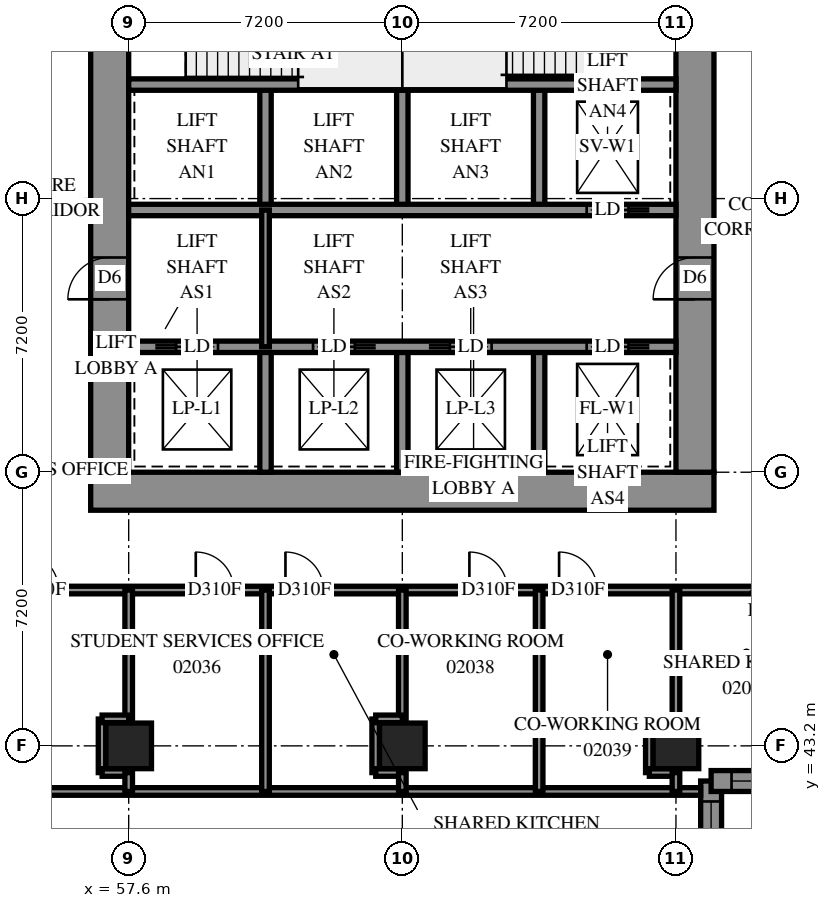
"""IFC4 building model, lengths in metres.
Left out: names, types, materials, properties, quantities, classifications, styles, units other than length and angle.
Written with IfcOpenShell. Run it as: python <this file> out.ifc"""

import sys

from ifc_helpers import new_model, si_unit, direction, frame, frame_2d, origin, origin_2d, place, context, subcontext, project, spatial, polyline, rectangle, outline, extrude, element, fill, save


model = new_model("IFC4")
c1 = context("Model", 3, precision=1e-05, world=origin(), true_north=direction((0.0, 1.0)))
c2 = subcontext(c1, "Body", "Model", "MODEL_VIEW")
j1 = project(units=[si_unit("LENGTHUNIT", "METRE"), si_unit("PLANEANGLEUNIT", "RADIAN")], contexts=[c1])
p1 = place(None, origin())
s1 = spatial("IfcSite", under=j1, at=p1, CompositionType="ELEMENT")
p2 = place(p1, origin())
s2 = spatial("IfcBuilding", under=s1, at=p2, CompositionType="ELEMENT")
p3 = place(p2, frame((0.0, 0.0, 10.2)))
s3 = spatial("IfcBuildingStorey", under=s2, at=p3, CompositionType="ELEMENT", Elevation=10.2)
for number, where, z_axis, x_axis in (
    (1, (57.6, 43.2, 0.0), (0.0, 0.0, 1.0), (1.0, 0.0, 0.0)),
    (2, (64.8, 43.2, 0.0), (0.0, 0.0, 1.0), (1.0, 0.0, 0.0)),
    (3, (72.0, 43.2, 0.0), (0.0, 0.0, 1.0), (1.0, 0.0, 0.0)),
):
    element("IfcColumn", number, at=place(p3, frame(where, z_axis=z_axis, x_axis=x_axis)), inside=s3, PredefinedType="COLUMN", context=c2, shape_type="SweptSolid", body=[
        extrude(rectangle(XDim=1.2, YDim=1.2, at=origin_2d()), origin(), (0.0, 0.0, 1.0), 3.8),
    ])
p4 = place(p3, frame((56.6, 49.9, -0.4), z_axis=(0.0, 0.0, 1.0), x_axis=(1.0, 0.0, 0.0)))
e4 = element("IfcWall", 4, at=p4, inside=s3, PredefinedType="SHEAR", context=c2, shape_type="SweptSolid", body=[
    extrude(rectangle(XDim=16.4, YDim=1.0, at=frame_2d((8.2, 0.0))), origin(), (0.0, 0.0, 1.0), 3.5),
])
p5 = place(p3, frame((57.1, 50.4, -0.4), z_axis=(0.0, 0.0, 1.0), x_axis=(0.0, 1.0, 0.0)))
e5 = element("IfcWall", 5, at=p5, inside=s3, PredefinedType="SHEAR", context=c2, shape_type="SweptSolid", body=[
    extrude(rectangle(XDim=14.4, YDim=1.0, at=frame_2d((7.2, 0.0))), origin(), (0.0, 0.0, 1.0), 3.5),
])
p6 = place(p5, frame((4.55, 0.0, 0.4)))
e6 = element("IfcOpeningElement", 6, at=p6, cuts=e5, PredefinedType="OPENING", context=c2, shape_type="SweptSolid", body=[
    extrude(rectangle(XDim=1.1, YDim=2.1, at=frame_2d((0.55, 1.05))), frame((0.0, 0.51, 0.0), z_axis=(0.0, -1.0, 0.0), x_axis=(1.0, 0.0, 0.0)), (0.0, 0.0, 1.0), 1.02),
])
p7 = place(p5, frame((11.35, 0.0, 0.4)))
e7 = element("IfcOpeningElement", 7, at=p7, cuts=e5, PredefinedType="OPENING", context=c2, shape_type="SweptSolid", body=[
    extrude(rectangle(XDim=1.1, YDim=2.1, at=frame_2d((0.55, 1.05))), frame((0.0, 0.51, 0.0), z_axis=(0.0, -1.0, 0.0), x_axis=(1.0, 0.0, 0.0)), (0.0, 0.0, 1.0), 1.02),
])
p8 = place(p3, frame((72.5, 50.4, -0.4), z_axis=(0.0, 0.0, 1.0), x_axis=(0.0, 1.0, 0.0)))
e8 = element("IfcWall", 8, at=p8, inside=s3, PredefinedType="SHEAR", context=c2, shape_type="SweptSolid", body=[
    extrude(rectangle(XDim=14.4, YDim=1.0, at=frame_2d((7.2, 0.0))), origin(), (0.0, 0.0, 1.0), 3.5),
])
p9 = place(p8, frame((4.55, 0.0, 0.4)))
e9 = element("IfcOpeningElement", 9, at=p9, cuts=e8, PredefinedType="OPENING", context=c2, shape_type="SweptSolid", body=[
    extrude(rectangle(XDim=1.1, YDim=2.1, at=frame_2d((0.55, 1.05))), frame((0.0, 0.51, 0.0), z_axis=(0.0, -1.0, 0.0), x_axis=(1.0, 0.0, 0.0)), (0.0, 0.0, 1.0), 1.02),
])
p10 = place(p8, frame((11.35, 0.0, 0.4)))
e10 = element("IfcOpeningElement", 10, at=p10, cuts=e8, PredefinedType="OPENING", context=c2, shape_type="SweptSolid", body=[
    extrude(rectangle(XDim=1.1, YDim=2.1, at=frame_2d((0.55, 1.05))), frame((0.0, 0.51, 0.0), z_axis=(0.0, -1.0, 0.0), x_axis=(1.0, 0.0, 0.0)), (0.0, 0.0, 1.0), 1.02),
])
for number, where, z_axis, x_axis in (
    (11, (61.2, 50.4, 0.0), (0.0, 0.0, 1.0), (0.0, 1.0, 0.0)),
    (12, (61.2, 57.3, 0.0), (0.0, 0.0, 1.0), (0.0, 1.0, 0.0)),
    (13, (64.8, 50.4, 0.0), (0.0, 0.0, 1.0), (0.0, 1.0, 0.0)),
    (14, (64.8, 57.3, 0.0), (0.0, 0.0, 1.0), (0.0, 1.0, 0.0)),
    (15, (68.4, 50.4, 0.0), (0.0, 0.0, 1.0), (0.0, 1.0, 0.0)),
    (16, (68.4, 57.3, 0.0), (0.0, 0.0, 1.0), (0.0, 1.0, 0.0)),
):
    element("IfcWall", number, at=place(p3, frame(where, z_axis=z_axis, x_axis=x_axis)), inside=s3, PredefinedType="SOLIDWALL", context=c2, shape_type="SweptSolid", body=[
        extrude(rectangle(XDim=3.3, YDim=0.3, at=frame_2d((1.65, 0.0))), origin(), (0.0, 0.0, 1.0), 3.8),
    ])
p11 = place(p3, frame((57.6, 53.7, 0.0), z_axis=(0.0, 0.0, 1.0), x_axis=(1.0, 0.0, 0.0)))
e17 = element("IfcWall", 17, at=p11, inside=s3, PredefinedType="SOLIDWALL", context=c2, shape_type="SweptSolid", body=[
    extrude(rectangle(XDim=14.4, YDim=0.3, at=frame_2d((7.2, 0.0))), origin(), (0.0, 0.0, 1.0), 3.8),
])
p12 = place(p11, frame((1.25, 0.0, 0.0)))
e18 = element("IfcOpeningElement", 18, at=p12, cuts=e17, PredefinedType="OPENING", context=c2, shape_type="SweptSolid", body=[
    extrude(rectangle(XDim=1.1, YDim=2.1, at=frame_2d((0.55, 1.05))), frame((0.0, 0.16, 0.0), z_axis=(0.0, -1.0, 0.0), x_axis=(1.0, 0.0, 0.0)), (0.0, 0.0, 1.0), 0.32),
])
p13 = place(p11, frame((4.85, 0.0, 0.0)))
e19 = element("IfcOpeningElement", 19, at=p13, cuts=e17, PredefinedType="OPENING", context=c2, shape_type="SweptSolid", body=[
    extrude(rectangle(XDim=1.1, YDim=2.1, at=frame_2d((0.55, 1.05))), frame((0.0, 0.16, 0.0), z_axis=(0.0, -1.0, 0.0), x_axis=(1.0, 0.0, 0.0)), (0.0, 0.0, 1.0), 0.32),
])
p14 = place(p11, frame((8.45, 0.0, 0.0)))
e20 = element("IfcOpeningElement", 20, at=p14, cuts=e17, PredefinedType="OPENING", context=c2, shape_type="SweptSolid", body=[
    extrude(rectangle(XDim=1.1, YDim=2.1, at=frame_2d((0.55, 1.05))), frame((0.0, 0.16, 0.0), z_axis=(0.0, -1.0, 0.0), x_axis=(1.0, 0.0, 0.0)), (0.0, 0.0, 1.0), 0.32),
])
p15 = place(p11, frame((12.05, 0.0, 0.0)))
e21 = element("IfcOpeningElement", 21, at=p15, cuts=e17, PredefinedType="OPENING", context=c2, shape_type="SweptSolid", body=[
    extrude(rectangle(XDim=1.1, YDim=2.1, at=frame_2d((0.55, 1.05))), frame((0.0, 0.16, 0.0), z_axis=(0.0, -1.0, 0.0), x_axis=(1.0, 0.0, 0.0)), (0.0, 0.0, 1.0), 0.32),
])
p16 = place(p3, frame((57.6, 57.3, 0.0), z_axis=(0.0, 0.0, 1.0), x_axis=(1.0, 0.0, 0.0)))
e22 = element("IfcWall", 22, at=p16, inside=s3, PredefinedType="SOLIDWALL", context=c2, shape_type="SweptSolid", body=[
    extrude(rectangle(XDim=14.4, YDim=0.3, at=frame_2d((7.2, 0.0))), origin(), (0.0, 0.0, 1.0), 3.8),
])
p17 = place(p16, frame((12.05, 0.0, 0.0)))
e23 = element("IfcOpeningElement", 23, at=p17, cuts=e22, PredefinedType="OPENING", context=c2, shape_type="SweptSolid", body=[
    extrude(rectangle(XDim=1.1, YDim=2.1, at=frame_2d((0.55, 1.05))), frame((0.0, 0.16, 0.0), z_axis=(0.0, -1.0, 0.0), x_axis=(1.0, 0.0, 0.0)), (0.0, 0.0, 1.0), 0.32),
])
for number, where, z_axis, x_axis in (
    (24, (57.6, 60.6, 0.0), (0.0, 0.0, 1.0), (1.0, 0.0, 0.0)),
    (25, (64.8, 60.6, 0.0), (0.0, 0.0, 1.0), (1.0, 0.0, 0.0)),
):
    element("IfcWall", number, at=place(p3, frame(where, z_axis=z_axis, x_axis=x_axis)), inside=s3, PredefinedType="SOLIDWALL", context=c2, shape_type="SweptSolid", body=[
        extrude(rectangle(XDim=7.2, YDim=0.3, at=frame_2d((3.6, 0.0))), origin(), (0.0, 0.0, 1.0), 3.8),
    ])
p18 = place(p3, frame((64.8, 60.6, 0.0), z_axis=(0.0, 0.0, 1.0), x_axis=(0.0, 1.0, 0.0)))
e26 = element("IfcWall", 26, at=p18, inside=s3, PredefinedType="SOLIDWALL", context=c2, shape_type="SweptSolid", body=[
    extrude(rectangle(XDim=4.2, YDim=0.3, at=frame_2d((2.1, 0.0))), origin(), (0.0, 0.0, 1.0), 3.8),
])
p19 = place(p3, frame((72.925, 20.675, 0.0), z_axis=(0.0, 0.0, 1.0), x_axis=(0.0, 1.0, 0.0)))
e27 = element("IfcWall", 27, at=p19, inside=s3, PredefinedType="SOLIDWALL", context=c2, shape_type="SweptSolid", body=[
    extrude(outline(polyline([(-0.275, -0.275), (21.325, -0.275), (21.875, 0.275), (0.275, 0.275), (-0.275, -0.275)])), origin(), (0.0, 0.0, 1.0), 3.8),
])
p20 = place(p19, frame((1.825, 0.0, 0.7)))
e28 = element("IfcOpeningElement", 28, at=p20, cuts=e27, PredefinedType="OPENING", context=c2, shape_type="SweptSolid", body=[
    extrude(rectangle(XDim=1.8, YDim=2.6, at=frame_2d((0.9, 1.3))), frame((0.0, 0.285, 0.0), z_axis=(0.0, -1.0, 0.0), x_axis=(1.0, 0.0, 0.0)), (0.0, 0.0, 1.0), 0.57),
])
p21 = place(p19, frame((5.425, 0.0, 0.7)))
e29 = element("IfcOpeningElement", 29, at=p21, cuts=e27, PredefinedType="OPENING", context=c2, shape_type="SweptSolid", body=[
    extrude(rectangle(XDim=1.8, YDim=2.6, at=frame_2d((0.9, 1.3))), frame((0.0, 0.285, 0.0), z_axis=(0.0, -1.0, 0.0), x_axis=(1.0, 0.0, 0.0)), (0.0, 0.0, 1.0), 0.57),
])
p22 = place(p19, frame((9.025, 0.0, 0.7)))
e30 = element("IfcOpeningElement", 30, at=p22, cuts=e27, PredefinedType="OPENING", context=c2, shape_type="SweptSolid", body=[
    extrude(rectangle(XDim=1.8, YDim=2.6, at=frame_2d((0.9, 1.3))), frame((0.0, 0.285, 0.0), z_axis=(0.0, -1.0, 0.0), x_axis=(1.0, 0.0, 0.0)), (0.0, 0.0, 1.0), 0.57),
])
p23 = place(p19, frame((12.625, 0.0, 0.7)))
e31 = element("IfcOpeningElement", 31, at=p23, cuts=e27, PredefinedType="OPENING", context=c2, shape_type="SweptSolid", body=[
    extrude(rectangle(XDim=1.8, YDim=2.6, at=frame_2d((0.9, 1.3))), frame((0.0, 0.285, 0.0), z_axis=(0.0, -1.0, 0.0), x_axis=(1.0, 0.0, 0.0)), (0.0, 0.0, 1.0), 0.57),
])
p24 = place(p19, frame((16.225, 0.0, 0.7)))
e32 = element("IfcOpeningElement", 32, at=p24, cuts=e27, PredefinedType="OPENING", context=c2, shape_type="SweptSolid", body=[
    extrude(rectangle(XDim=1.8, YDim=2.6, at=frame_2d((0.9, 1.3))), frame((0.0, 0.285, 0.0), z_axis=(0.0, -1.0, 0.0), x_axis=(1.0, 0.0, 0.0)), (0.0, 0.0, 1.0), 0.57),
])
p25 = place(p19, frame((19.262, 0.0, 0.7)))
e33 = element("IfcOpeningElement", 33, at=p25, cuts=e27, PredefinedType="OPENING", context=c2, shape_type="SweptSolid", body=[
    extrude(rectangle(XDim=1.8, YDim=2.6, at=frame_2d((0.9, 1.3))), frame((0.0, 0.285, 0.0), z_axis=(0.0, -1.0, 0.0), x_axis=(1.0, 0.0, 0.0)), (0.0, 0.0, 1.0), 0.57),
])
p26 = place(p3, frame((72.925, 42.275, 0.0), z_axis=(0.0, 0.0, 1.0), x_axis=(1.0, 0.0, 0.0)))
e34 = element("IfcWall", 34, at=p26, inside=s3, PredefinedType="SOLIDWALL", context=c2, shape_type="SweptSolid", body=[
    extrude(outline(polyline([(0.275, -0.275), (4.031, -0.275), (4.259, 0.275), (-0.275, 0.275), (0.275, -0.275)])), origin(), (0.0, 0.0, 1.0), 3.8),
])
p27 = place(p26, frame((0.537, 0.0, 0.7)))
e35 = element("IfcOpeningElement", 35, at=p27, cuts=e34, PredefinedType="OPENING", context=c2, shape_type="SweptSolid", body=[
    extrude(rectangle(XDim=1.8, YDim=2.6, at=frame_2d((0.9, 1.3))), frame((0.0, 0.285, 0.0), z_axis=(0.0, -1.0, 0.0), x_axis=(1.0, 0.0, 0.0)), (0.0, 0.0, 1.0), 0.57),
])
p28 = place(p3, frame((61.2, 53.7, 0.0), z_axis=(0.0, 0.0, 1.0), x_axis=(0.0, 1.0, 0.0)))
e36 = element("IfcWall", 36, at=p28, inside=s3, PredefinedType="PARTITIONING", context=c2, shape_type="SweptSolid", body=[
    extrude(rectangle(XDim=3.6, YDim=0.2, at=frame_2d((1.8, 0.0))), origin(), (0.0, 0.0, 1.0), 3.8),
])
p29 = place(p3, frame((13.75, 42.0, 0.0), z_axis=(0.0, 0.0, 1.0), x_axis=(1.0, 0.0, 0.0)))
e37 = element("IfcWall", 37, at=p29, inside=s3, PredefinedType="PARTITIONING", context=c2, shape_type="SweptSolid", body=[
    extrude(rectangle(XDim=58.9, YDim=0.2, at=frame_2d((29.45, 0.0))), origin(), (0.0, 0.0, 1.0), 3.8),
])
p30 = place(p3, frame((54.5, 47.3, 0.0), z_axis=(0.0, 0.0, 1.0), x_axis=(1.0, 0.0, 0.0)))
e38 = element("IfcWall", 38, at=p30, inside=s3, PredefinedType="PARTITIONING", context=c2, shape_type="SweptSolid", body=[
    extrude(rectangle(XDim=19.56, YDim=0.2, at=frame_2d((9.78, 0.0))), origin(), (0.0, 0.0, 1.0), 3.8),
])
p31 = place(p30, frame((0.252, 0.0, 0.0)))
e39 = element("IfcOpeningElement", 39, at=p31, cuts=e38, PredefinedType="OPENING", context=c2, shape_type="SweptSolid", body=[
    extrude(rectangle(XDim=1.0, YDim=2.1, at=frame_2d((0.5, 1.05))), frame((0.0, 0.11, 0.0), z_axis=(0.0, -1.0, 0.0), x_axis=(1.0, 0.0, 0.0)), (0.0, 0.0, 1.0), 0.22),
])
p32 = place(p30, frame((4.865, 0.0, 0.0)))
e40 = element("IfcOpeningElement", 40, at=p32, cuts=e38, PredefinedType="OPENING", context=c2, shape_type="SweptSolid", body=[
    extrude(rectangle(XDim=1.0, YDim=2.1, at=frame_2d((0.5, 1.05))), frame((0.0, 0.11, 0.0), z_axis=(0.0, -1.0, 0.0), x_axis=(1.0, 0.0, 0.0)), (0.0, 0.0, 1.0), 0.22),
])
p33 = place(p30, frame((7.225, 0.0, 0.0)))
e41 = element("IfcOpeningElement", 41, at=p33, cuts=e38, PredefinedType="OPENING", context=c2, shape_type="SweptSolid", body=[
    extrude(rectangle(XDim=1.0, YDim=2.1, at=frame_2d((0.5, 1.05))), frame((0.0, 0.11, 0.0), z_axis=(0.0, -1.0, 0.0), x_axis=(1.0, 0.0, 0.0)), (0.0, 0.0, 1.0), 0.22),
])
p34 = place(p30, frame((12.065, 0.0, 0.0)))
e42 = element("IfcOpeningElement", 42, at=p34, cuts=e38, PredefinedType="OPENING", context=c2, shape_type="SweptSolid", body=[
    extrude(rectangle(XDim=1.0, YDim=2.1, at=frame_2d((0.5, 1.05))), frame((0.0, 0.11, 0.0), z_axis=(0.0, -1.0, 0.0), x_axis=(1.0, 0.0, 0.0)), (0.0, 0.0, 1.0), 0.22),
])
p35 = place(p30, frame((14.425, 0.0, 0.0)))
e43 = element("IfcOpeningElement", 43, at=p35, cuts=e38, PredefinedType="OPENING", context=c2, shape_type="SweptSolid", body=[
    extrude(rectangle(XDim=1.0, YDim=2.1, at=frame_2d((0.5, 1.05))), frame((0.0, 0.11, 0.0), z_axis=(0.0, -1.0, 0.0), x_axis=(1.0, 0.0, 0.0)), (0.0, 0.0, 1.0), 0.22),
])
for number, where, z_axis, x_axis in (
    (44, (61.2, 42.0, 0.0), (0.0, 0.0, 1.0), (0.0, 1.0, 0.0)),
    (45, (68.4, 42.0, 0.0), (0.0, 0.0, 1.0), (0.0, 1.0, 0.0)),
):
    element("IfcWall", number, at=place(p3, frame(where, z_axis=z_axis, x_axis=x_axis)), inside=s3, PredefinedType="PARTITIONING", context=c2, shape_type="SweptSolid", body=[
        extrude(rectangle(XDim=5.3, YDim=0.2, at=frame_2d((2.65, 0.0))), origin(), (0.0, 0.0, 1.0), 3.8),
    ])
p36 = place(p3, frame((74.057, 47.297, 0.0), z_axis=(0.0, 0.0, 1.0), x_axis=(0.7071067812, -0.7071067812, 0.0)))
e46 = element("IfcWall", 46, at=p36, inside=s3, PredefinedType="PARTITIONING", context=c2, shape_type="SweptSolid", body=[
    extrude(rectangle(XDim=4.653, YDim=0.2, at=frame_2d((2.326, 0.0))), origin(), (0.0, 0.0, 1.0), 3.8),
])
p37 = place(p36, frame((0.267, 0.0, 0.0)))
e47 = element("IfcOpeningElement", 47, at=p37, cuts=e46, PredefinedType="OPENING", context=c2, shape_type="SweptSolid", body=[
    extrude(rectangle(XDim=1.0, YDim=2.1, at=frame_2d((0.5, 1.05))), frame((0.0, 0.11, 0.0), z_axis=(0.0, -1.0, 0.0), x_axis=(1.0, 0.0, 0.0)), (0.0, 0.0, 1.0), 0.22),
])
for number, where, z_axis, x_axis in (
    (48, (57.6, 43.906, 0.0), (0.0, 0.0, 1.0), (0.0, 1.0, 0.0)),
    (49, (64.8, 43.906, 0.0), (0.0, 0.0, 1.0), (0.0, 1.0, 0.0)),
    (50, (72.0, 43.906, 0.0), (0.0, 0.0, 1.0), (0.0, 1.0, 0.0)),
):
    element("IfcWall", number, at=place(p3, frame(where, z_axis=z_axis, x_axis=x_axis)), inside=s3, PredefinedType="PARTITIONING", context=c2, shape_type="SweptSolid", body=[
        extrude(rectangle(XDim=3.394, YDim=0.2, at=frame_2d((1.697, 0.0))), origin(), (0.0, 0.0, 1.0), 3.8),
    ])
for number, where, z_axis, x_axis in (
    (51, (56.9, 42.496, 0.0), (0.0, 0.0, 1.0), (0.0, 1.0, 0.0)),
    (52, (64.1, 42.496, 0.0), (0.0, 0.0, 1.0), (0.0, 1.0, 0.0)),
    (53, (71.3, 42.496, 0.0), (0.0, 0.0, 1.0), (0.0, 1.0, 0.0)),
):
    element("IfcWall", number, at=place(p3, frame(where, z_axis=z_axis, x_axis=x_axis)), inside=s3, PredefinedType="PARTITIONING", context=c2, shape_type="SweptSolid", body=[
        extrude(rectangle(XDim=1.41, YDim=0.2, at=frame_2d((0.705, 0.0))), origin(), (0.0, 0.0, 1.0), 3.8),
    ])
for number, where, z_axis, x_axis in (
    (54, (56.9, 43.91, 0.0), (0.0, 0.0, 1.0), (1.0, 0.0, 0.0)),
    (55, (64.1, 43.91, 0.0), (0.0, 0.0, 1.0), (1.0, 0.0, 0.0)),
    (56, (71.3, 43.91, 0.0), (0.0, 0.0, 1.0), (1.0, 0.0, 0.0)),
    (57, (56.9, 42.5, 0.0), (0.0, 0.0, 1.0), (1.0, 0.0, 0.0)),
    (58, (64.1, 42.5, 0.0), (0.0, 0.0, 1.0), (1.0, 0.0, 0.0)),
    (59, (71.3, 42.5, 0.0), (0.0, 0.0, 1.0), (1.0, 0.0, 0.0)),
):
    element("IfcWall", number, at=place(p3, frame(where, z_axis=z_axis, x_axis=x_axis)), inside=s3, PredefinedType="PARTITIONING", context=c2, shape_type="SweptSolid", body=[
        extrude(rectangle(XDim=0.7, YDim=0.2, at=frame_2d((0.35, 0.0))), origin(), (0.0, 0.0, 1.0), 3.8),
    ])
for number, where, z_axis, x_axis in (
    (60, (57.6, 42.0, 0.0), (0.0, 0.0, 1.0), (0.0, 1.0, 0.0)),
    (61, (64.8, 42.0, 0.0), (0.0, 0.0, 1.0), (0.0, 1.0, 0.0)),
):
    element("IfcWall", number, at=place(p3, frame(where, z_axis=z_axis, x_axis=x_axis)), inside=s3, PredefinedType="PARTITIONING", context=c2, shape_type="SweptSolid", body=[
        extrude(rectangle(XDim=0.496, YDim=0.2, at=frame_2d((0.248, 0.0))), origin(), (0.0, 0.0, 1.0), 3.8),
    ])
p38 = place(p3, frame((72.0, 42.0, 0.0), z_axis=(0.0, 0.0, 1.0), x_axis=(0.0, 1.0, 0.0)))
e62 = element("IfcWall", 62, at=p38, inside=s3, PredefinedType="PARTITIONING", context=c2, shape_type="SweptSolid", body=[
    extrude(rectangle(XDim=0.496, YDim=0.2, at=frame_2d((0.248, 0.0))), origin(), (0.0, 0.0, 1.0), 3.2),
])
p39 = place(p25, origin())
e63 = element("IfcWindow", 63, at=p39, inside=s3, PartitioningType="SINGLE_PANEL", PredefinedType="WINDOW", context=c2, shape_type="SweptSolid", body=[
    extrude(rectangle(XDim=1.8, YDim=2.6, at=frame_2d((0.9, 1.3))), frame((0.0, 0.155, 0.0), z_axis=(0.0, -1.0, 0.0), x_axis=(1.0, 0.0, 0.0)), (0.0, 0.0, 1.0), 0.06),
])
fill(e33, e63)
p40 = place(p27, origin())
e64 = element("IfcWindow", 64, at=p40, inside=s3, PartitioningType="SINGLE_PANEL", PredefinedType="WINDOW", context=c2, shape_type="SweptSolid", body=[
    extrude(rectangle(XDim=1.8, YDim=2.6, at=frame_2d((0.9, 1.3))), frame((0.0, 0.155, 0.0), z_axis=(0.0, -1.0, 0.0), x_axis=(1.0, 0.0, 0.0)), (0.0, 0.0, 1.0), 0.06),
])
fill(e35, e64)
p41 = place(p6, origin())
e65 = element("IfcDoor", 65, at=p41, inside=s3, OperationType="DOUBLE_DOOR_SINGLE_SWING", PredefinedType="DOOR", context=c2, shape_type="SweptSolid", body=[
    extrude(rectangle(XDim=1.1, YDim=2.1, at=frame_2d((0.55, 1.05))), frame((0.0, 0.025, 0.0), z_axis=(0.0, -1.0, 0.0), x_axis=(1.0, 0.0, 0.0)), (0.0, 0.0, 1.0), 0.05),
])
fill(e6, e65)
p42 = place(p9, origin())
e66 = element("IfcDoor", 66, at=p42, inside=s3, OperationType="DOUBLE_DOOR_SINGLE_SWING", PredefinedType="DOOR", context=c2, shape_type="SweptSolid", body=[
    extrude(rectangle(XDim=1.1, YDim=2.1, at=frame_2d((0.55, 1.05))), frame((0.0, 0.025, 0.0), z_axis=(0.0, -1.0, 0.0), x_axis=(1.0, 0.0, 0.0)), (0.0, 0.0, 1.0), 0.05),
])
fill(e9, e66)
p43 = place(p12, origin())
e67 = element("IfcDoor", 67, at=p43, inside=s3, OperationType="SLIDING_TO_LEFT", PredefinedType="DOOR", context=c2, shape_type="SweptSolid", body=[
    extrude(rectangle(XDim=1.1, YDim=2.1, at=frame_2d((0.55, 1.05))), frame((0.0, 0.025, 0.0), z_axis=(0.0, -1.0, 0.0), x_axis=(1.0, 0.0, 0.0)), (0.0, 0.0, 1.0), 0.05),
])
fill(e18, e67)
p44 = place(p13, origin())
e68 = element("IfcDoor", 68, at=p44, inside=s3, OperationType="SLIDING_TO_RIGHT", PredefinedType="DOOR", context=c2, shape_type="SweptSolid", body=[
    extrude(rectangle(XDim=1.1, YDim=2.1, at=frame_2d((0.55, 1.05))), frame((0.0, 0.025, 0.0), z_axis=(0.0, -1.0, 0.0), x_axis=(1.0, 0.0, 0.0)), (0.0, 0.0, 1.0), 0.05),
])
fill(e19, e68)
p45 = place(p14, origin())
e69 = element("IfcDoor", 69, at=p45, inside=s3, OperationType="SLIDING_TO_LEFT", PredefinedType="DOOR", context=c2, shape_type="SweptSolid", body=[
    extrude(rectangle(XDim=1.1, YDim=2.1, at=frame_2d((0.55, 1.05))), frame((0.0, 0.025, 0.0), z_axis=(0.0, -1.0, 0.0), x_axis=(1.0, 0.0, 0.0)), (0.0, 0.0, 1.0), 0.05),
])
fill(e20, e69)
p46 = place(p15, origin())
e70 = element("IfcDoor", 70, at=p46, inside=s3, OperationType="SLIDING_TO_RIGHT", PredefinedType="DOOR", context=c2, shape_type="SweptSolid", body=[
    extrude(rectangle(XDim=1.1, YDim=2.1, at=frame_2d((0.55, 1.05))), frame((0.0, 0.025, 0.0), z_axis=(0.0, -1.0, 0.0), x_axis=(1.0, 0.0, 0.0)), (0.0, 0.0, 1.0), 0.05),
])
fill(e21, e70)
p47 = place(p17, origin())
e71 = element("IfcDoor", 71, at=p47, inside=s3, OperationType="SLIDING_TO_RIGHT", PredefinedType="DOOR", context=c2, shape_type="SweptSolid", body=[
    extrude(rectangle(XDim=1.1, YDim=2.1, at=frame_2d((0.55, 1.05))), frame((0.0, 0.025, 0.0), z_axis=(0.0, -1.0, 0.0), x_axis=(1.0, 0.0, 0.0)), (0.0, 0.0, 1.0), 0.05),
])
fill(e23, e71)
p48 = place(p31, origin())
e72 = element("IfcDoor", 72, at=p48, inside=s3, OperationType="SINGLE_SWING_RIGHT", PredefinedType="DOOR", context=c2, shape_type="SweptSolid", body=[
    extrude(rectangle(XDim=1.0, YDim=2.1, at=frame_2d((0.5, 1.05))), frame((0.0, 0.025, 0.0), z_axis=(0.0, -1.0, 0.0), x_axis=(1.0, 0.0, 0.0)), (0.0, 0.0, 1.0), 0.05),
])
fill(e39, e72)
p49 = place(p32, origin())
e73 = element("IfcDoor", 73, at=p49, inside=s3, OperationType="SINGLE_SWING_LEFT", PredefinedType="DOOR", context=c2, shape_type="SweptSolid", body=[
    extrude(rectangle(XDim=1.0, YDim=2.1, at=frame_2d((0.5, 1.05))), frame((0.0, 0.025, 0.0), z_axis=(0.0, -1.0, 0.0), x_axis=(1.0, 0.0, 0.0)), (0.0, 0.0, 1.0), 0.05),
])
fill(e40, e73)
p50 = place(p33, origin())
e74 = element("IfcDoor", 74, at=p50, inside=s3, OperationType="SINGLE_SWING_RIGHT", PredefinedType="DOOR", context=c2, shape_type="SweptSolid", body=[
    extrude(rectangle(XDim=1.0, YDim=2.1, at=frame_2d((0.5, 1.05))), frame((0.0, 0.025, 0.0), z_axis=(0.0, -1.0, 0.0), x_axis=(1.0, 0.0, 0.0)), (0.0, 0.0, 1.0), 0.05),
])
fill(e41, e74)
p51 = place(p34, origin())
e75 = element("IfcDoor", 75, at=p51, inside=s3, OperationType="SINGLE_SWING_LEFT", PredefinedType="DOOR", context=c2, shape_type="SweptSolid", body=[
    extrude(rectangle(XDim=1.0, YDim=2.1, at=frame_2d((0.5, 1.05))), frame((0.0, 0.025, 0.0), z_axis=(0.0, -1.0, 0.0), x_axis=(1.0, 0.0, 0.0)), (0.0, 0.0, 1.0), 0.05),
])
fill(e42, e75)
p52 = place(p35, origin())
e76 = element("IfcDoor", 76, at=p52, inside=s3, OperationType="SINGLE_SWING_RIGHT", PredefinedType="DOOR", context=c2, shape_type="SweptSolid", body=[
    extrude(rectangle(XDim=1.0, YDim=2.1, at=frame_2d((0.5, 1.05))), frame((0.0, 0.025, 0.0), z_axis=(0.0, -1.0, 0.0), x_axis=(1.0, 0.0, 0.0)), (0.0, 0.0, 1.0), 0.05),
])
fill(e43, e76)
save(model, sys.argv[1])
